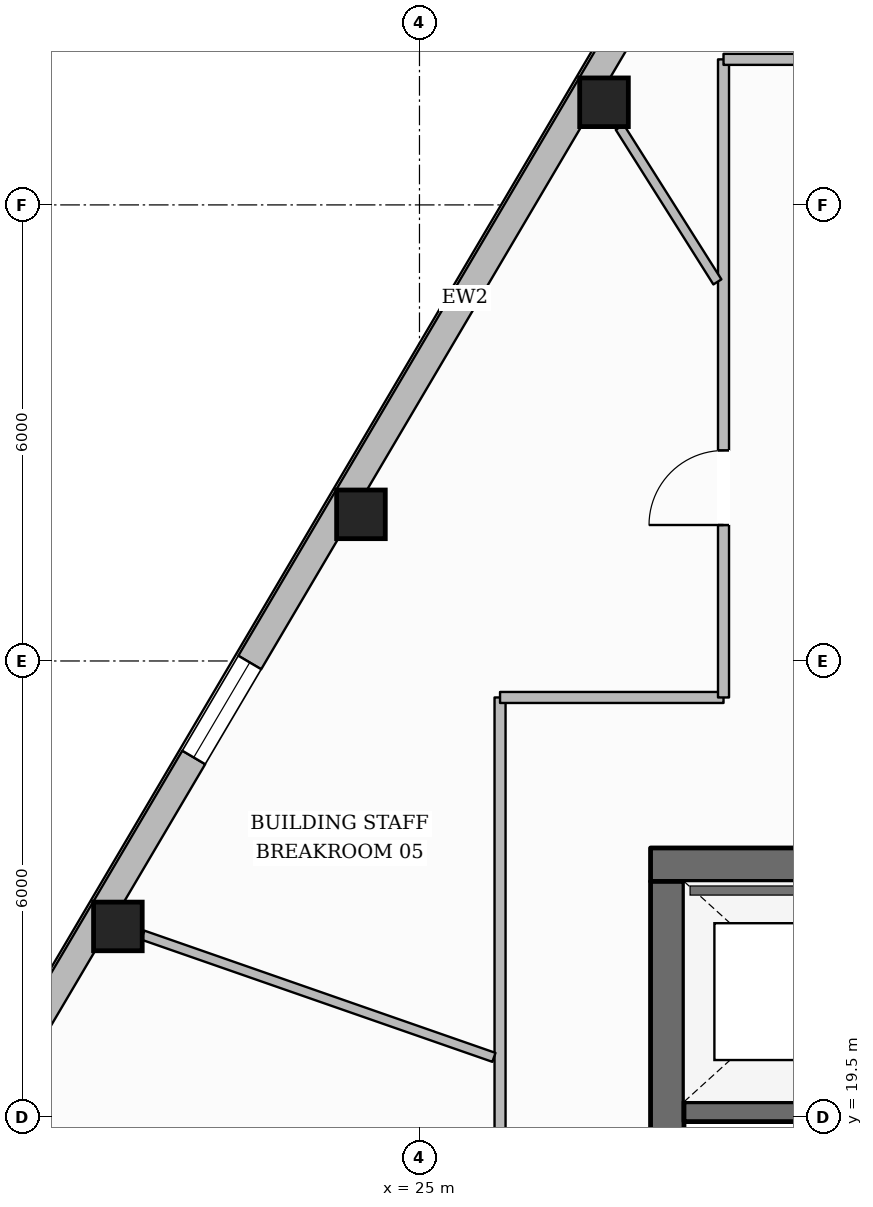
"""IFC4 building model, lengths in metres.
Left out: names, types, materials, properties, quantities, classifications, styles, units other than length and angle.
Written with IfcOpenShell. Run it as: python <this file> out.ifc"""

import sys

from ifc_helpers import new_model, si_unit, direction, frame, frame_2d, origin, origin_2d, place, context, subcontext, project, spatial, rectangle, hollow_rectangle, extrude, element, fill, save


model = new_model("IFC4")
c1 = context("Model", 3, precision=1e-05, world=origin(), true_north=direction((0.0, 1.0)))
c2 = subcontext(c1, "Body", "Model", "MODEL_VIEW")
j1 = project(units=[si_unit("LENGTHUNIT", "METRE"), si_unit("PLANEANGLEUNIT", "RADIAN")], contexts=[c1])
p1 = place(None, origin())
s1 = spatial("IfcSite", under=j1, at=p1, CompositionType="ELEMENT")
p2 = place(p1, origin())
s2 = spatial("IfcBuilding", under=s1, at=p2, CompositionType="ELEMENT")
p3 = place(p2, frame((0.0, 0.0, 211.2)))
s3 = spatial("IfcBuildingStorey", under=s2, at=p3, CompositionType="ELEMENT", Elevation=211.2)
p4 = place(p3, frame((28.04, 22.82, 0.0), z_axis=(0.0, 0.0, 1.0), x_axis=(1.0, 0.0, 0.0)))
e1 = element("IfcWall", 1, at=p4, inside=s3, PredefinedType="SOLIDWALL", context=c2, shape_type="SweptSolid", body=[
    extrude(rectangle(XDim=19.92, YDim=0.44, at=frame_2d((9.96, 0.0))), origin(), (0.0, 0.0, 1.0), 3.6),
])
p5 = place(p4, frame((6.235, 0.0, 0.0)))
e2 = element("IfcOpeningElement", 2, at=p5, cuts=e1, PredefinedType="OPENING", context=c2, shape_type="SweptSolid", body=[
    extrude(rectangle(XDim=1.05, YDim=2.15, at=frame_2d((0.525, 1.075))), frame((0.0, 0.23, 0.0), z_axis=(0.0, -1.0, 0.0), x_axis=(1.0, 0.0, 0.0)), (0.0, 0.0, 1.0), 0.46),
])
p6 = place(p4, frame((12.635, 0.0, 0.0)))
e3 = element("IfcOpeningElement", 3, at=p6, cuts=e1, PredefinedType="OPENING", context=c2, shape_type="SweptSolid", body=[
    extrude(rectangle(XDim=1.05, YDim=2.15, at=frame_2d((0.525, 1.075))), frame((0.0, 0.23, 0.0), z_axis=(0.0, -1.0, 0.0), x_axis=(1.0, 0.0, 0.0)), (0.0, 0.0, 1.0), 0.46),
])
p7 = place(p3, frame((28.26, 9.6, 0.0), z_axis=(0.0, 0.0, 1.0), x_axis=(0.0, 1.0, 0.0)))
e4 = element("IfcWall", 4, at=p7, inside=s3, PredefinedType="SOLIDWALL", context=c2, shape_type="SweptSolid", body=[
    extrude(rectangle(XDim=13.0, YDim=0.44, at=frame_2d((6.5, 0.0))), origin(), (0.0, 0.0, 1.0), 3.6),
])
p8 = place(p7, frame((0.2, 0.0, 0.0)))
e5 = element("IfcOpeningElement", 5, at=p8, cuts=e4, PredefinedType="OPENING", context=c2, shape_type="SweptSolid", body=[
    extrude(rectangle(XDim=1.1, YDim=2.15, at=frame_2d((0.55, 1.075))), frame((0.0, 0.23, 0.0), z_axis=(0.0, -1.0, 0.0), x_axis=(1.0, 0.0, 0.0)), (0.0, 0.0, 1.0), 0.46),
])
p9 = place(p7, frame((8.4, 0.0, 0.0)))
e6 = element("IfcOpeningElement", 6, at=p9, cuts=e4, PredefinedType="OPENING", context=c2, shape_type="SweptSolid", body=[
    extrude(rectangle(XDim=0.9, YDim=2.1, at=frame_2d((0.45, 1.05))), frame((0.0, 0.23, 0.0), z_axis=(0.0, -1.0, 0.0), x_axis=(1.0, 0.0, 0.0)), (0.0, 0.0, 1.0), 0.46),
])
p10 = place(p3, frame((28.48, 19.57, 0.0), z_axis=(0.0, 0.0, 1.0), x_axis=(1.0, 0.0, 0.0)))
e7 = element("IfcWall", 7, at=p10, inside=s3, PredefinedType="SHEAR", context=c2, shape_type="SweptSolid", body=[
    extrude(rectangle(XDim=3.2, YDim=0.26, at=frame_2d((1.6, 0.0))), origin(), (0.0, 0.0, 1.0), 3.6),
])
for number, where, z_axis, x_axis in (
    (8, (27.428, 32.85, 0.0), (0.0, 0.0, 1.0), (1.0, 0.0, 0.0)),
    (9, (24.23, 27.429, 0.0), (0.0, 0.0, 1.0), (1.0, 0.0, 0.0)),
    (10, (21.032, 22.008, 0.0), (0.0, 0.0, 1.0), (1.0, 0.0, 0.0)),
):
    element("IfcColumn", number, at=place(p3, frame(where, z_axis=z_axis, x_axis=x_axis)), inside=s3, PredefinedType="COLUMN", context=c2, shape_type="SweptSolid", body=[
        extrude(hollow_rectangle(XDim=0.64, YDim=0.64, WallThickness=0.028, at=origin_2d()), origin(), (0.0, 0.0, 1.0), 3.6),
    ])
p11 = place(p3, frame((14.16, 10.888, 0.0), z_axis=(0.0, 0.0, 1.0), x_axis=(0.508058913236, 0.861322321017, 0.0)))
e11 = element("IfcWall", 11, at=p11, inside=s3, PredefinedType="STANDARD", context=c2, shape_type="SweptSolid", body=[
    extrude(rectangle(XDim=38.718, YDim=0.35, at=frame_2d((19.359, 0.0))), origin(), (0.0, 0.0, 1.0), 3.132),
])
p12 = place(p11, frame((34.374, 0.0, 0.65)))
e12 = element("IfcOpeningElement", 12, at=p12, cuts=e11, PredefinedType="OPENING", context=c2, shape_type="SweptSolid", body=[
    extrude(rectangle(XDim=1.45, YDim=1.75, at=frame_2d((0.725, 0.875))), frame((0.0, 0.185, 0.0), z_axis=(0.0, -1.0, 0.0), x_axis=(1.0, 0.0, 0.0)), (0.0, 0.0, 1.0), 0.37),
])
p13 = place(p11, frame((28.08, 0.0, 0.65)))
e13 = element("IfcOpeningElement", 13, at=p13, cuts=e11, PredefinedType="OPENING", context=c2, shape_type="SweptSolid", body=[
    extrude(rectangle(XDim=1.45, YDim=1.75, at=frame_2d((0.725, 0.875))), frame((0.0, 0.185, 0.0), z_axis=(0.0, -1.0, 0.0), x_axis=(1.0, 0.0, 0.0)), (0.0, 0.0, 1.0), 0.37),
])
p14 = place(p11, frame((15.491, 0.0, 0.65)))
e14 = element("IfcOpeningElement", 14, at=p14, cuts=e11, PredefinedType="OPENING", context=c2, shape_type="SweptSolid", body=[
    extrude(rectangle(XDim=1.45, YDim=1.75, at=frame_2d((0.725, 0.875))), frame((0.0, 0.185, 0.0), z_axis=(0.0, -1.0, 0.0), x_axis=(1.0, 0.0, 0.0)), (0.0, 0.0, 1.0), 0.37),
])
p15 = place(p11, frame((9.197, 0.0, 0.65)))
e15 = element("IfcOpeningElement", 15, at=p15, cuts=e11, PredefinedType="OPENING", context=c2, shape_type="SweptSolid", body=[
    extrude(rectangle(XDim=1.45, YDim=1.75, at=frame_2d((0.725, 0.875))), frame((0.0, 0.185, 0.0), z_axis=(0.0, -1.0, 0.0), x_axis=(1.0, 0.0, 0.0)), (0.0, 0.0, 1.0), 0.37),
])
p16 = place(p11, frame((2.903, 0.0, 0.65)))
e16 = element("IfcOpeningElement", 16, at=p16, cuts=e11, PredefinedType="OPENING", context=c2, shape_type="SweptSolid", body=[
    extrude(rectangle(XDim=1.45, YDim=1.75, at=frame_2d((0.725, 0.875))), frame((0.0, 0.185, 0.0), z_axis=(0.0, -1.0, 0.0), x_axis=(1.0, 0.0, 0.0)), (0.0, 0.0, 1.0), 0.37),
])
p17 = place(p3, frame((26.06, 17.65, 0.0), z_axis=(0.0, 0.0, 1.0), x_axis=(0.0, 1.0, 0.0)))
e17 = element("IfcWall", 17, at=p17, inside=s3, PredefinedType="PARTITIONING", context=c2, shape_type="SweptSolid", body=[
    extrude(rectangle(XDim=7.37, YDim=0.145, at=frame_2d((3.685, 0.0))), origin(), (0.0, 0.0, 1.0), 3.339),
])
p18 = place(p3, frame((26.06, 25.02, 0.0), z_axis=(0.0, 0.0, 1.0), x_axis=(1.0, 0.0, 0.0)))
e18 = element("IfcWall", 18, at=p18, inside=s3, PredefinedType="PARTITIONING", context=c2, shape_type="SweptSolid", body=[
    extrude(rectangle(XDim=2.94, YDim=0.145, at=frame_2d((1.47, 0.0))), origin(), (0.0, 0.0, 1.0), 3.6),
])
p19 = place(p3, frame((29.0, 25.02, 0.0), z_axis=(0.0, 0.0, 1.0), x_axis=(0.0, 1.0, 0.0)))
e19 = element("IfcWall", 19, at=p19, inside=s3, PredefinedType="PARTITIONING", context=c2, shape_type="SweptSolid", body=[
    extrude(rectangle(XDim=8.395, YDim=0.145, at=frame_2d((4.197, 0.0))), origin(), (0.0, 0.0, 1.0), 3.6),
])
p20 = place(p19, frame((2.269, 0.0, 0.0)))
e20 = element("IfcOpeningElement", 20, at=p20, cuts=e19, PredefinedType="OPENING", context=c2, shape_type="SweptSolid", body=[
    extrude(rectangle(XDim=0.98, YDim=2.15, at=frame_2d((0.49, 1.075))), frame((0.0, 0.083, 0.0), z_axis=(0.0, -1.0, 0.0), x_axis=(1.0, 0.0, 0.0)), (0.0, 0.0, 1.0), 0.165),
])
p21 = place(p3, frame((29.0, 33.415, 0.0), z_axis=(0.0, 0.0, 1.0), x_axis=(1.0, 0.0, 0.0)))
e21 = element("IfcWall", 21, at=p21, inside=s3, PredefinedType="PARTITIONING", context=c2, shape_type="SweptSolid", body=[
    extrude(rectangle(XDim=2.0, YDim=0.145, at=frame_2d((1.0, 0.0))), origin(), (0.0, 0.0, 1.0), 3.6),
])
p22 = place(p3, frame((28.919, 30.487, 0.0), z_axis=(0.0, 0.0, 1.0), x_axis=(-0.533741092176, 0.845647944787, 0.0)))
e22 = element("IfcWall", 22, at=p22, inside=s3, PredefinedType="PARTITIONING", context=c2, shape_type="SweptSolid", body=[
    extrude(rectangle(XDim=2.407, YDim=0.125, at=frame_2d((1.204, 0.0))), origin(), (0.0, 0.0, 1.0), 3.6),
])
p23 = place(p3, frame((25.979, 20.285, 0.0), z_axis=(0.0, 0.0, 1.0), x_axis=(-0.944391705218, 0.328822607366, 0.0)))
e23 = element("IfcWall", 23, at=p23, inside=s3, PredefinedType="PARTITIONING", context=c2, shape_type="SweptSolid", body=[
    extrude(rectangle(XDim=4.891, YDim=0.125, at=frame_2d((2.446, 0.0))), origin(), (0.0, 0.0, 1.0), 3.6),
])
p24 = place(p14, origin())
e24 = element("IfcWindow", 24, at=p24, inside=s3, PartitioningType="SINGLE_PANEL", PredefinedType="WINDOW", context=c2, shape_type="SweptSolid", body=[
    extrude(rectangle(XDim=1.45, YDim=1.75, at=frame_2d((0.725, 0.875))), frame((0.0, 0.03, 0.0), z_axis=(0.0, -1.0, 0.0), x_axis=(1.0, 0.0, 0.0)), (0.0, 0.0, 1.0), 0.06),
])
fill(e14, e24)
p25 = place(p20, origin())
e25 = element("IfcDoor", 25, at=p25, inside=s3, OperationType="SINGLE_SWING_LEFT", PredefinedType="DOOR", context=c2, shape_type="SweptSolid", body=[
    extrude(rectangle(XDim=0.98, YDim=2.15, at=frame_2d((0.49, 1.075))), frame((0.0, 0.025, 0.0), z_axis=(0.0, -1.0, 0.0), x_axis=(1.0, 0.0, 0.0)), (0.0, 0.0, 1.0), 0.05),
])
fill(e20, e25)
save(model, sys.argv[1])
